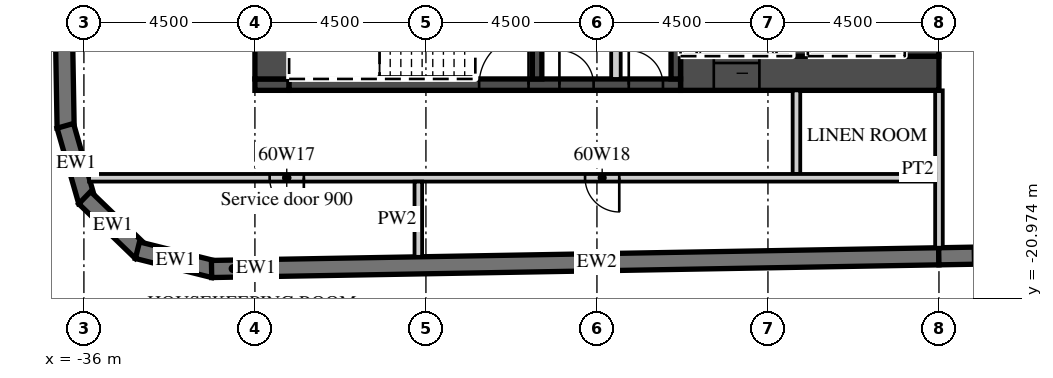
"""IFC4 building model, lengths in metres.
Left out: names, types, materials, properties, quantities, classifications, styles, units other than length and angle.
Written with IfcOpenShell. Run it as: python <this file> out.ifc"""

import sys

from ifc_helpers import new_model, si_unit, direction, frame, frame_2d, origin, place, context, subcontext, project, spatial, polyline, rectangle, outline, extrude, element, fill, save


model = new_model("IFC4")
c1 = context("Model", 3, precision=1e-05, world=origin(), true_north=direction((0.0, 1.0)))
c2 = subcontext(c1, "Body", "Model", "MODEL_VIEW")
j1 = project(units=[si_unit("LENGTHUNIT", "METRE"), si_unit("PLANEANGLEUNIT", "RADIAN")], contexts=[c1])
p1 = place(None, origin())
s1 = spatial("IfcSite", under=j1, at=p1, CompositionType="ELEMENT")
p2 = place(p1, origin())
s2 = spatial("IfcBuilding", under=s1, at=p2, CompositionType="ELEMENT")
p3 = place(p2, frame((0.0, 0.0, 244.1)))
s3 = spatial("IfcBuildingStorey", under=s2, at=p3, CompositionType="ELEMENT", Elevation=244.1)
p4 = place(p3, frame((-37.057, 16.503, 0.0), z_axis=(0.0, 0.0, 1.0), x_axis=(0.017452279857, -0.999847697366, 0.0)))
e1 = element("IfcWall", 1, at=p4, inside=s3, PredefinedType="SOLIDWALL", context=c2, shape_type="SweptSolid", body=[
    extrude(rectangle(XDim=33.0, YDim=0.45, at=frame_2d((16.5, 0.0))), origin(), (0.0, 0.0, 1.0), 3.02),
])
p5 = place(p3, frame((-36.49, -16.434, 0.0), z_axis=(0.0, 0.0, 1.0), x_axis=(0.275577603096, -0.961278827745, 0.0)))
e2 = element("IfcWall", 2, at=p5, inside=s3, PredefinedType="SOLIDWALL", context=c2, shape_type="SweptSolid", body=[
    extrude(outline(polyline([(0.0, -0.225), (2.071, -0.225), (1.95, 0.225), (0.121, 0.225), (0.0, -0.225)])), origin(), (0.0, 0.0, 1.0), 3.02),
])
p6 = place(p3, frame((-35.979, -18.324, 0.0), z_axis=(0.0, 0.0, 1.0), x_axis=(0.719320193998, -0.694678672846, 0.0)))
e3 = element("IfcWall", 3, at=p6, inside=s3, PredefinedType="SOLIDWALL", context=c2, shape_type="SweptSolid", body=[
    extrude(outline(polyline([(0.0, -0.225), (2.071, -0.225), (1.95, 0.225), (0.121, 0.225), (0.0, -0.225)])), origin(), (0.0, 0.0, 1.0), 3.02),
])
p7 = place(p3, frame((-34.591, -19.706, 0.0), z_axis=(0.0, 0.0, 1.0), x_axis=(0.970315655375, -0.241841950319, 0.0)))
e4 = element("IfcWall", 4, at=p7, inside=s3, PredefinedType="SOLIDWALL", context=c2, shape_type="SweptSolid", body=[
    extrude(outline(polyline([(0.0, -0.225), (2.071, -0.225), (1.95, 0.225), (0.121, 0.225), (0.0, -0.225)])), origin(), (0.0, 0.0, 1.0), 3.02),
])
p8 = place(p3, frame((-32.641, -20.2, 0.0), z_axis=(0.0, 0.0, 1.0), x_axis=(0.99984870815, 0.017394275206, 0.0)))
e5 = element("IfcWall", 5, at=p8, inside=s3, PredefinedType="SOLIDWALL", context=c2, shape_type="SweptSolid", body=[
    extrude(rectangle(XDim=1.137, YDim=0.45, at=frame_2d((0.568, 0.0))), origin(), (0.0, 0.0, 1.0), 3.02),
])
p9 = place(p3, frame((-31.504, -20.18, 0.0), z_axis=(0.0, 0.0, 1.0), x_axis=(0.999847677887, 0.017453395744, 0.0)))
e6 = element("IfcWall", 6, at=p9, inside=s3, PredefinedType="SOLIDWALL", context=c2, shape_type="SweptSolid", body=[
    extrude(rectangle(XDim=18.003, YDim=0.45, at=frame_2d((9.001, 0.0))), origin(), (0.0, 0.0, 1.0), 3.02),
])
p10 = place(p3, frame((-13.504, -19.866, 0.0), z_axis=(0.0, 0.0, 1.0), x_axis=(0.999847672978, 0.017453676992, 0.0)))
e7 = element("IfcWall", 7, at=p10, inside=s3, PredefinedType="SOLIDWALL", context=c2, shape_type="SweptSolid", body=[
    extrude(rectangle(XDim=52.86, YDim=0.45, at=frame_2d((26.43, 0.0))), origin(), (0.0, 0.0, 1.0), 3.02),
])
p11 = place(p10, frame((0.9, 0.0, 0.45)))
e8 = element("IfcOpeningElement", 8, at=p11, cuts=e7, PredefinedType="OPENING", context=c2, shape_type="SweptSolid", body=[
    extrude(rectangle(XDim=2.7, YDim=2.25, at=frame_2d((1.35, 1.125))), frame((0.0, 0.235, 0.0), z_axis=(0.0, -1.0, 0.0), x_axis=(1.0, 0.0, 0.0)), (0.0, 0.0, 1.0), 0.47),
])
p12 = place(p10, frame((5.401, 0.0, 0.45)))
e9 = element("IfcOpeningElement", 9, at=p12, cuts=e7, PredefinedType="OPENING", context=c2, shape_type="SweptSolid", body=[
    extrude(rectangle(XDim=2.7, YDim=2.25, at=frame_2d((1.35, 1.125))), frame((0.0, 0.235, 0.0), z_axis=(0.0, -1.0, 0.0), x_axis=(1.0, 0.0, 0.0)), (0.0, 0.0, 1.0), 0.47),
])
p13 = place(p10, frame((9.902, 0.0, 0.45)))
e10 = element("IfcOpeningElement", 10, at=p13, cuts=e7, PredefinedType="OPENING", context=c2, shape_type="SweptSolid", body=[
    extrude(rectangle(XDim=2.7, YDim=2.25, at=frame_2d((1.35, 1.125))), frame((0.0, 0.235, 0.0), z_axis=(0.0, -1.0, 0.0), x_axis=(1.0, 0.0, 0.0)), (0.0, 0.0, 1.0), 0.47),
])
p14 = place(p10, frame((14.402, 0.0, 0.45)))
e11 = element("IfcOpeningElement", 11, at=p14, cuts=e7, PredefinedType="OPENING", context=c2, shape_type="SweptSolid", body=[
    extrude(rectangle(XDim=2.7, YDim=2.25, at=frame_2d((1.35, 1.125))), frame((0.0, 0.235, 0.0), z_axis=(0.0, -1.0, 0.0), x_axis=(1.0, 0.0, 0.0)), (0.0, 0.0, 1.0), 0.47),
])
p15 = place(p10, frame((18.903, 0.0, 0.45)))
e12 = element("IfcOpeningElement", 12, at=p15, cuts=e7, PredefinedType="OPENING", context=c2, shape_type="SweptSolid", body=[
    extrude(rectangle(XDim=2.7, YDim=2.25, at=frame_2d((1.35, 1.125))), frame((0.0, 0.235, 0.0), z_axis=(0.0, -1.0, 0.0), x_axis=(1.0, 0.0, 0.0)), (0.0, 0.0, 1.0), 0.47),
])
p16 = place(p10, frame((23.404, 0.0, 0.45)))
e13 = element("IfcOpeningElement", 13, at=p16, cuts=e7, PredefinedType="OPENING", context=c2, shape_type="SweptSolid", body=[
    extrude(rectangle(XDim=2.7, YDim=2.25, at=frame_2d((1.35, 1.125))), frame((0.0, 0.235, 0.0), z_axis=(0.0, -1.0, 0.0), x_axis=(1.0, 0.0, 0.0)), (0.0, 0.0, 1.0), 0.47),
])
p17 = place(p10, frame((27.904, 0.0, 0.45)))
e14 = element("IfcOpeningElement", 14, at=p17, cuts=e7, PredefinedType="OPENING", context=c2, shape_type="SweptSolid", body=[
    extrude(rectangle(XDim=2.7, YDim=2.25, at=frame_2d((1.35, 1.125))), frame((0.0, 0.235, 0.0), z_axis=(0.0, -1.0, 0.0), x_axis=(1.0, 0.0, 0.0)), (0.0, 0.0, 1.0), 0.47),
])
p18 = place(p10, frame((32.405, 0.0, 0.45)))
e15 = element("IfcOpeningElement", 15, at=p18, cuts=e7, PredefinedType="OPENING", context=c2, shape_type="SweptSolid", body=[
    extrude(rectangle(XDim=2.7, YDim=2.25, at=frame_2d((1.35, 1.125))), frame((0.0, 0.235, 0.0), z_axis=(0.0, -1.0, 0.0), x_axis=(1.0, 0.0, 0.0)), (0.0, 0.0, 1.0), 0.47),
])
p19 = place(p10, frame((36.906, 0.0, 0.45)))
e16 = element("IfcOpeningElement", 16, at=p19, cuts=e7, PredefinedType="OPENING", context=c2, shape_type="SweptSolid", body=[
    extrude(rectangle(XDim=2.7, YDim=2.25, at=frame_2d((1.35, 1.125))), frame((0.0, 0.235, 0.0), z_axis=(0.0, -1.0, 0.0), x_axis=(1.0, 0.0, 0.0)), (0.0, 0.0, 1.0), 0.47),
])
p20 = place(p10, frame((41.406, 0.0, 0.45)))
e17 = element("IfcOpeningElement", 17, at=p20, cuts=e7, PredefinedType="OPENING", context=c2, shape_type="SweptSolid", body=[
    extrude(rectangle(XDim=2.7, YDim=2.25, at=frame_2d((1.35, 1.125))), frame((0.0, 0.235, 0.0), z_axis=(0.0, -1.0, 0.0), x_axis=(1.0, 0.0, 0.0)), (0.0, 0.0, 1.0), 0.47),
])
p21 = place(p10, frame((45.907, 0.0, 0.45)))
e18 = element("IfcOpeningElement", 18, at=p21, cuts=e7, PredefinedType="OPENING", context=c2, shape_type="SweptSolid", body=[
    extrude(rectangle(XDim=2.7, YDim=2.25, at=frame_2d((1.35, 1.125))), frame((0.0, 0.235, 0.0), z_axis=(0.0, -1.0, 0.0), x_axis=(1.0, 0.0, 0.0)), (0.0, 0.0, 1.0), 0.47),
])
p22 = place(p3, frame((-13.5, -19.641, 0.0), z_axis=(0.0, 0.0, 1.0), x_axis=(0.0, 1.0, 0.0)))
e19 = element("IfcWall", 19, at=p22, inside=s3, PredefinedType="PARTITIONING", context=c2, shape_type="SweptSolid", body=[
    extrude(rectangle(XDim=4.141, YDim=0.2, at=frame_2d((2.071, 0.0))), origin(), (0.0, 0.0, 1.0), 3.02),
])
p23 = place(p3, frame((-20.3, -15.05, 0.0), z_axis=(0.0, 0.0, 1.0), x_axis=(1.0, 0.0, 0.0)))
e20 = element("IfcWall", 20, at=p23, inside=s3, PredefinedType="SHEAR", context=c2, shape_type="SweptSolid", body=[
    extrude(rectangle(XDim=6.8, YDim=0.9, at=frame_2d((3.4, 0.0))), origin(), (0.0, 0.0, 1.0), 3.02),
])
p24 = place(p23, frame((0.875, 0.0, 0.0)))
e21 = element("IfcOpeningElement", 21, at=p24, cuts=e20, PredefinedType="OPENING", context=c2, shape_type="SweptSolid", body=[
    extrude(rectangle(XDim=1.2, YDim=2.1, at=frame_2d((0.6, 1.05))), frame((0.0, 0.46, 0.0), z_axis=(0.0, -1.0, 0.0), x_axis=(1.0, 0.0, 0.0)), (0.0, 0.0, 1.0), 0.92),
])
p25 = place(p3, frame((-31.5, -15.35, 0.0), z_axis=(0.0, 0.0, 1.0), x_axis=(1.0, 0.0, 0.0)))
e22 = element("IfcWall", 22, at=p25, inside=s3, PredefinedType="SHEAR", context=c2, shape_type="SweptSolid", body=[
    extrude(rectangle(XDim=0.9, YDim=0.3, at=frame_2d((0.45, 0.0))), origin(), (0.0, 0.0, 1.0), 3.02),
])
p26 = place(p3, frame((-30.6, -15.35, 0.0), z_axis=(0.0, 0.0, 1.0), x_axis=(1.0, 0.0, 0.0)))
e23 = element("IfcWall", 23, at=p26, inside=s3, PredefinedType="SHEAR", context=c2, shape_type="SweptSolid", body=[
    extrude(rectangle(XDim=10.3, YDim=0.3, at=frame_2d((5.15, 0.0))), origin(), (0.0, 0.0, 1.0), 3.02),
])
p27 = place(p26, frame((5.0, 0.0, 0.0)))
e24 = element("IfcOpeningElement", 24, at=p27, cuts=e23, PredefinedType="OPENING", context=c2, shape_type="SweptSolid", body=[
    extrude(rectangle(XDim=1.3, YDim=2.1, at=frame_2d((0.65, 1.05))), frame((0.0, 0.16, 0.0), z_axis=(0.0, -1.0, 0.0), x_axis=(1.0, 0.0, 0.0)), (0.0, 0.0, 1.0), 0.32),
])
p28 = place(p26, frame((7.113, 0.0, 0.0)))
e25 = element("IfcOpeningElement", 25, at=p28, cuts=e23, PredefinedType="OPENING", context=c2, shape_type="SweptSolid", body=[
    extrude(rectangle(XDim=0.9, YDim=2.1, at=frame_2d((0.45, 1.05))), frame((0.0, 0.16, 0.0), z_axis=(0.0, -1.0, 0.0), x_axis=(1.0, 0.0, 0.0)), (0.0, 0.0, 1.0), 0.32),
])
p29 = place(p26, frame((8.938, 0.0, 0.0)))
e26 = element("IfcOpeningElement", 26, at=p29, cuts=e23, PredefinedType="OPENING", context=c2, shape_type="SweptSolid", body=[
    extrude(rectangle(XDim=0.9, YDim=2.1, at=frame_2d((0.45, 1.05))), frame((0.0, 0.16, 0.0), z_axis=(0.0, -1.0, 0.0), x_axis=(1.0, 0.0, 0.0)), (0.0, 0.0, 1.0), 0.32),
])
p30 = place(p3, frame((-31.05, -15.2, 0.0), z_axis=(0.0, 0.0, 1.0), x_axis=(0.0, 1.0, 0.0)))
e27 = element("IfcWall", 27, at=p30, inside=s3, PredefinedType="SHEAR", context=c2, shape_type="SweptSolid", body=[
    extrude(rectangle(XDim=12.8, YDim=0.9, at=frame_2d((6.4, 0.0))), origin(), (0.0, 0.0, 1.0), 3.02),
])
p31 = place(p30, frame((11.5, 0.0, 0.0)))
e28 = element("IfcOpeningElement", 28, at=p31, cuts=e27, PredefinedType="OPENING", context=c2, shape_type="SweptSolid", body=[
    extrude(rectangle(XDim=1.1, YDim=2.1, at=frame_2d((0.55, 1.05))), frame((0.0, 0.46, 0.0), z_axis=(0.0, -1.0, 0.0), x_axis=(1.0, 0.0, 0.0)), (0.0, 0.0, 1.0), 0.92),
])
p32 = place(p3, frame((-13.95, -14.6, 0.0), z_axis=(0.0, 0.0, 1.0), x_axis=(0.0, 1.0, 0.0)))
e29 = element("IfcWall", 29, at=p32, inside=s3, PredefinedType="SHEAR", context=c2, shape_type="SweptSolid", body=[
    extrude(rectangle(XDim=12.2, YDim=0.9, at=frame_2d((6.1, 0.0))), origin(), (0.0, 0.0, 1.0), 3.02),
])
p33 = place(p3, frame((-17.15, -14.6, 0.0), z_axis=(0.0, 0.0, 1.0), x_axis=(0.0, 1.0, 0.0)))
e30 = element("IfcWall", 30, at=p33, inside=s3, PredefinedType="SHEAR", context=c2, shape_type="SweptSolid", body=[
    extrude(rectangle(XDim=5.8, YDim=0.4, at=frame_2d((2.9, 0.0))), origin(), (0.0, 0.0, 1.0), 3.02),
])
for number, where, z_axis, x_axis in (
    (31, (-20.425, -15.2, 0.0), (0.0, 0.0, 1.0), (0.0, 1.0, 0.0)),
    (32, (-24.075, -15.2, 0.0), (0.0, 0.0, 1.0), (0.0, 1.0, 0.0)),
):
    element("IfcWall", number, at=place(p3, frame(where, z_axis=z_axis, x_axis=x_axis)), inside=s3, PredefinedType="SHEAR", context=c2, shape_type="SweptSolid", body=[
        extrude(rectangle(XDim=3.25, YDim=0.25, at=frame_2d((1.625, 0.0))), origin(), (0.0, 0.0, 1.0), 3.02),
    ])
p34 = place(p3, frame((-22.0, -15.2, 0.0), z_axis=(0.0, 0.0, 1.0), x_axis=(0.0, 1.0, 0.0)))
e33 = element("IfcWall", 33, at=p34, inside=s3, PredefinedType="PARTITIONING", context=c2, shape_type="SweptSolid", body=[
    extrude(rectangle(XDim=3.25, YDim=0.25, at=frame_2d((1.625, 0.0))), origin(), (0.0, 0.0, 1.0), 3.02),
])
p35 = place(p3, frame((-17.25, -17.7, 0.0), z_axis=(0.0, 0.0, 1.0), x_axis=(0.0, 1.0, 0.0)))
e34 = element("IfcWall", 34, at=p35, inside=s3, PredefinedType="PARTITIONING", context=c2, shape_type="SweptSolid", body=[
    extrude(rectangle(XDim=2.2, YDim=0.2, at=frame_2d((1.1, 0.0))), origin(), (0.0, 0.0, 1.0), 3.02),
])
p36 = place(p3, frame((-35.864, -17.8, 0.0), z_axis=(0.0, 0.0, 1.0), x_axis=(1.0, 0.0, 0.0)))
e35 = element("IfcWall", 35, at=p36, inside=s3, PredefinedType="PARTITIONING", context=c2, shape_type="SweptSolid", body=[
    extrude(rectangle(XDim=22.264, YDim=0.2, at=frame_2d((11.132, 0.0))), origin(), (0.0, 0.0, 1.0), 3.02),
])
p37 = place(p36, frame((4.751, 0.0, 0.0)))
e36 = element("IfcOpeningElement", 36, at=p37, cuts=e35, PredefinedType="OPENING", context=c2, shape_type="SweptSolid", body=[
    extrude(rectangle(XDim=0.9, YDim=2.1, at=frame_2d((0.45, 1.05))), frame((0.0, 0.11, 0.0), z_axis=(0.0, -1.0, 0.0), x_axis=(1.0, 0.0, 0.0)), (0.0, 0.0, 1.0), 0.22),
])
p38 = place(p36, frame((13.051, 0.0, 0.0)))
e37 = element("IfcOpeningElement", 37, at=p38, cuts=e35, PredefinedType="OPENING", context=c2, shape_type="SweptSolid", body=[
    extrude(rectangle(XDim=0.9, YDim=2.1, at=frame_2d((0.45, 1.05))), frame((0.0, 0.11, 0.0), z_axis=(0.0, -1.0, 0.0), x_axis=(1.0, 0.0, 0.0)), (0.0, 0.0, 1.0), 0.22),
])
p39 = place(p3, frame((-27.2, -19.88, 0.0), z_axis=(0.0, 0.0, 1.0), x_axis=(0.0, 1.0, 0.0)))
e38 = element("IfcWall", 38, at=p39, inside=s3, PredefinedType="PARTITIONING", context=c2, shape_type="SweptSolid", body=[
    extrude(rectangle(XDim=1.98, YDim=0.2, at=frame_2d((0.99, 0.0))), origin(), (0.0, 0.0, 1.0), 3.02),
])
p40 = place(p11, origin())
e39 = element("IfcWindow", 39, at=p40, inside=s3, PartitioningType="SINGLE_PANEL", PredefinedType="WINDOW", context=c2, shape_type="SweptSolid", body=[
    extrude(rectangle(XDim=2.7, YDim=2.25, at=frame_2d((1.35, 1.125))), frame((0.0, 0.09, 0.0), z_axis=(0.0, -1.0, 0.0), x_axis=(1.0, 0.0, 0.0)), (0.0, 0.0, 1.0), 0.06),
])
fill(e8, e39)
p41 = place(p24, origin())
e40 = element("IfcDoor", 40, at=p41, inside=s3, OperationType="SLIDING_TO_LEFT", PredefinedType="DOOR", context=c2, shape_type="SweptSolid", body=[
    extrude(rectangle(XDim=1.2, YDim=2.1, at=frame_2d((0.6, 1.05))), frame((0.0, 0.025, 0.0), z_axis=(0.0, -1.0, 0.0), x_axis=(1.0, 0.0, 0.0)), (0.0, 0.0, 1.0), 0.05),
])
fill(e21, e40)
p42 = place(p27, origin())
e41 = element("IfcDoor", 41, at=p42, inside=s3, OperationType="SINGLE_SWING_RIGHT", PredefinedType="DOOR", context=c2, shape_type="SweptSolid", body=[
    extrude(rectangle(XDim=1.3, YDim=2.1, at=frame_2d((0.65, 1.05))), frame((0.0, 0.025, 0.0), z_axis=(0.0, -1.0, 0.0), x_axis=(1.0, 0.0, 0.0)), (0.0, 0.0, 1.0), 0.05),
])
fill(e24, e41)
p43 = place(p28, origin())
e42 = element("IfcDoor", 42, at=p43, inside=s3, OperationType="SINGLE_SWING_LEFT", PredefinedType="DOOR", context=c2, shape_type="SweptSolid", body=[
    extrude(rectangle(XDim=0.9, YDim=2.1, at=frame_2d((0.45, 1.05))), frame((0.0, 0.025, 0.0), z_axis=(0.0, -1.0, 0.0), x_axis=(1.0, 0.0, 0.0)), (0.0, 0.0, 1.0), 0.05),
])
fill(e25, e42)
p44 = place(p29, origin())
e43 = element("IfcDoor", 43, at=p44, inside=s3, OperationType="SINGLE_SWING_LEFT", PredefinedType="DOOR", context=c2, shape_type="SweptSolid", body=[
    extrude(rectangle(XDim=0.9, YDim=2.1, at=frame_2d((0.45, 1.05))), frame((0.0, 0.025, 0.0), z_axis=(0.0, -1.0, 0.0), x_axis=(1.0, 0.0, 0.0)), (0.0, 0.0, 1.0), 0.05),
])
fill(e26, e43)
p45 = place(p37, origin())
e44 = element("IfcDoor", 44, at=p45, inside=s3, OperationType="SINGLE_SWING_RIGHT", PredefinedType="DOOR", context=c2, shape_type="SweptSolid", body=[
    extrude(rectangle(XDim=0.9, YDim=2.1, at=frame_2d((0.45, 1.05))), frame((0.0, 0.025, 0.0), z_axis=(0.0, -1.0, 0.0), x_axis=(1.0, 0.0, 0.0)), (0.0, 0.0, 1.0), 0.05),
])
fill(e36, e44)
p46 = place(p38, origin())
e45 = element("IfcDoor", 45, at=p46, inside=s3, OperationType="SINGLE_SWING_RIGHT", PredefinedType="DOOR", context=c2, shape_type="SweptSolid", body=[
    extrude(rectangle(XDim=0.9, YDim=2.1, at=frame_2d((0.45, 1.05))), frame((0.0, 0.025, 0.0), z_axis=(0.0, -1.0, 0.0), x_axis=(1.0, 0.0, 0.0)), (0.0, 0.0, 1.0), 0.05),
])
fill(e37, e45)
save(model, sys.argv[1])
